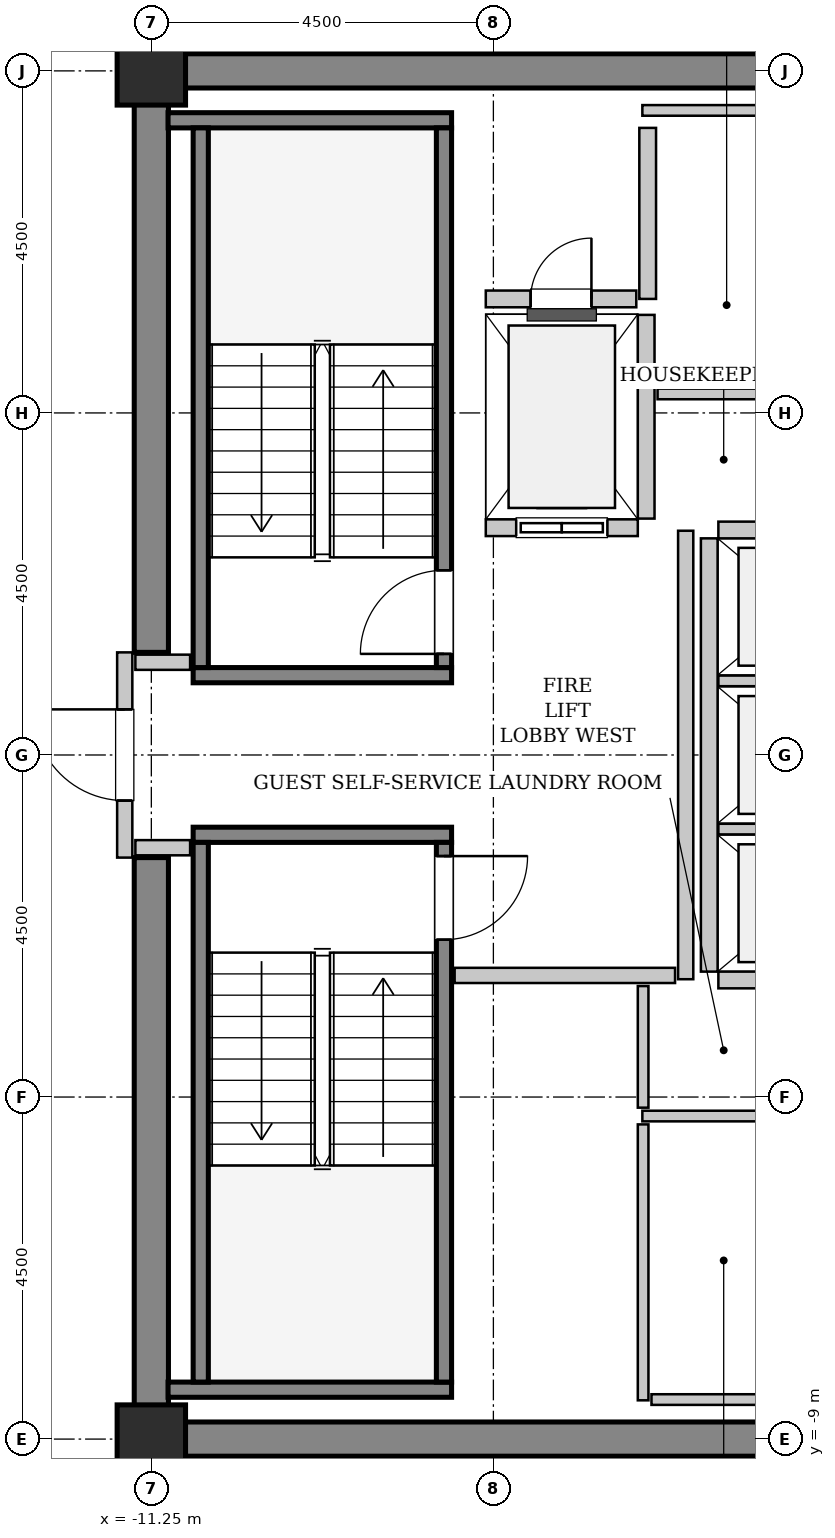
"""IFC4 building model, lengths in metres.
Left out: names, types, materials, properties, quantities, classifications, styles, units other than length and angle.
Written with IfcOpenShell. Run it as: python <this file> out.ifc"""

import sys

from ifc_helpers import new_model, si_unit, direction, frame, frame_2d, origin, origin_2d, place, context, subcontext, project, spatial, rectangle, extrude, source, transform, mapped, element, fill, save


model = new_model("IFC4")
c1 = context("Model", 3, precision=1e-05, world=origin(), true_north=direction((0.0, 1.0)))
c2 = subcontext(c1, "Body", "Model", "MODEL_VIEW")
j1 = project(units=[si_unit("LENGTHUNIT", "METRE"), si_unit("PLANEANGLEUNIT", "RADIAN")], contexts=[c1])
p1 = place(None, origin())
s1 = spatial("IfcSite", under=j1, at=p1, CompositionType="ELEMENT")
p2 = place(p1, origin())
s2 = spatial("IfcBuilding", under=s1, at=p2, CompositionType="ELEMENT")
p3 = place(p2, frame((0.0, 0.0, 314.0)))
s3 = spatial("IfcBuildingStorey", under=s2, at=p3, CompositionType="ELEMENT", Elevation=314.0)
m1 = source(origin(), c2, "Body", "SweptSolid", [
    extrude(rectangle(XDim=9.925, YDim=0.45, at=frame_2d((4.962, 0.0))), origin(), (0.0, 0.0, 1.0), 3.8),
])
for number, where, z_axis, x_axis in (
    (1, (-11.475, 9.0, 0.0), (0.0, 0.0, 1.0), (1.0, 0.0, 0.0)),
    (2, (-11.475, -9.0, 0.0), (0.0, 0.0, 1.0), (1.0, 0.0, 0.0)),
):
    element("IfcWall", number, at=place(p3, frame(where, z_axis=z_axis, x_axis=x_axis)), inside=s3, PredefinedType="SHEAR", context=c2, shape_type="MappedRepresentation", body=[
        mapped(m1, transform((0.0, 0.0, 0.0), x_axis=(1.0, 0.0, 0.0), y_axis=(0.0, 1.0, 0.0), z_axis=(0.0, 0.0, 1.0), scale=1.0)),
    ])
m2 = source(origin(), c2, "Body", "SweptSolid", [
    extrude(rectangle(XDim=7.425, YDim=0.45, at=frame_2d((3.712, 0.0))), origin(), (0.0, 0.0, 1.0), 3.8),
])
for number, where, z_axis, x_axis in (
    (3, (-11.25, -8.775, 0.0), (0.0, 0.0, 1.0), (0.0, 1.0, 0.0)),
    (4, (-11.25, 1.35, 0.0), (0.0, 0.0, 1.0), (0.0, 1.0, 0.0)),
):
    element("IfcWall", number, at=place(p3, frame(where, z_axis=z_axis, x_axis=x_axis)), inside=s3, PredefinedType="SHEAR", context=c2, shape_type="MappedRepresentation", body=[
        mapped(m2, transform((0.0, 0.0, 0.0), x_axis=(1.0, 0.0, 0.0), y_axis=(0.0, 1.0, 0.0), z_axis=(0.0, 0.0, 1.0), scale=1.0)),
    ])
m3 = source(origin(), c2, "Body", "SweptSolid", [
    extrude(rectangle(XDim=0.9, YDim=0.9, at=origin_2d()), origin(), (0.0, 0.0, 1.0), 3.8),
])
for number, where, z_axis, x_axis in (
    (5, (-11.25, -9.0, 0.0), (0.0, 0.0, 1.0), (1.0, 0.0, 0.0)),
    (6, (-11.25, 9.0, 0.0), (0.0, 0.0, 1.0), (1.0, 0.0, 0.0)),
):
    element("IfcColumn", number, at=place(p3, frame(where, z_axis=z_axis, x_axis=x_axis)), inside=s3, PredefinedType="COLUMN", context=c2, shape_type="MappedRepresentation", body=[
        mapped(m3, transform((0.0, 0.0, 0.0), x_axis=(1.0, 0.0, 0.0), y_axis=(0.0, 1.0, 0.0), z_axis=(0.0, 0.0, 1.0), scale=1.0)),
    ])
m4 = source(origin(), c2, "Body", "SweptSolid", [
    extrude(rectangle(XDim=3.4, YDim=0.2, at=frame_2d((1.7, 0.0))), origin(), (0.0, 0.0, 1.0), 3.8),
])
p4 = place(p3, frame((-7.3, 1.05, 0.0), z_axis=(0.0, 0.0, 1.0), x_axis=(-1.0, 0.0, 0.0)))
e7 = element("IfcWall", 7, at=p4, inside=s3, PredefinedType="SOLIDWALL", context=c2, shape_type="MappedRepresentation", body=[
    mapped(m4, transform((0.0, 0.0, 0.0), x_axis=(1.0, 0.0, 0.0), y_axis=(0.0, 1.0, 0.0), z_axis=(0.0, 0.0, 1.0), scale=1.0)),
])
m5 = source(origin(), c2, "Body", "SweptSolid", [
    extrude(rectangle(XDim=3.73, YDim=0.2, at=frame_2d((1.865, 0.0))), origin(), (0.0, 0.0, 1.0), 3.8),
])
p5 = place(p3, frame((-7.3, 8.35, 0.0), z_axis=(0.0, 0.0, 1.0), x_axis=(-1.0, 0.0, 0.0)))
e8 = element("IfcWall", 8, at=p5, inside=s3, PredefinedType="SOLIDWALL", context=c2, shape_type="MappedRepresentation", body=[
    mapped(m5, transform((0.0, 0.0, 0.0), x_axis=(1.0, 0.0, 0.0), y_axis=(0.0, 1.0, 0.0), z_axis=(0.0, 0.0, 1.0), scale=1.0)),
])
m6 = source(origin(), c2, "Body", "SweptSolid", [
    extrude(rectangle(XDim=7.1, YDim=0.2, at=frame_2d((3.55, 0.0))), origin(), (0.0, 0.0, 1.0), 3.8),
])
p6 = place(p3, frame((-7.4, 1.15, 0.0), z_axis=(0.0, 0.0, 1.0), x_axis=(0.0, 1.0, 0.0)))
e9 = element("IfcWall", 9, at=p6, inside=s3, PredefinedType="SOLIDWALL", context=c2, shape_type="MappedRepresentation", body=[
    mapped(m6, transform((0.0, 0.0, 0.0), x_axis=(1.0, 0.0, 0.0), y_axis=(0.0, 1.0, 0.0), z_axis=(0.0, 0.0, 1.0), scale=1.0)),
])
p7 = place(p6, frame((0.18, 0.0, 0.0)))
e10 = element("IfcOpeningElement", 10, at=p7, cuts=e9, PredefinedType="OPENING", context=c2, shape_type="SweptSolid", body=[
    extrude(rectangle(XDim=1.1, YDim=2.15, at=frame_2d((0.55, 1.075))), frame((0.0, 0.11, 0.0), z_axis=(0.0, -1.0, 0.0), x_axis=(1.0, 0.0, 0.0)), (0.0, 0.0, 1.0), 0.22),
])
p8 = place(p3, frame((-10.6, 1.15, 0.0), z_axis=(0.0, 0.0, 1.0), x_axis=(0.0, 1.0, 0.0)))
e11 = element("IfcWall", 11, at=p8, inside=s3, PredefinedType="SOLIDWALL", context=c2, shape_type="MappedRepresentation", body=[
    mapped(m6, transform((0.0, 0.0, 0.0), x_axis=(1.0, 0.0, 0.0), y_axis=(0.0, 1.0, 0.0), z_axis=(0.0, 0.0, 1.0), scale=1.0)),
])
p9 = place(p3, frame((-10.7, -1.05, 0.0), z_axis=(0.0, 0.0, 1.0), x_axis=(1.0, 0.0, 0.0)))
e12 = element("IfcWall", 12, at=p9, inside=s3, PredefinedType="SOLIDWALL", context=c2, shape_type="MappedRepresentation", body=[
    mapped(m4, transform((0.0, 0.0, 0.0), x_axis=(1.0, 0.0, 0.0), y_axis=(0.0, 1.0, 0.0), z_axis=(0.0, 0.0, 1.0), scale=1.0)),
])
p10 = place(p3, frame((-11.03, -8.35, 0.0), z_axis=(0.0, 0.0, 1.0), x_axis=(1.0, 0.0, 0.0)))
e13 = element("IfcWall", 13, at=p10, inside=s3, PredefinedType="SOLIDWALL", context=c2, shape_type="MappedRepresentation", body=[
    mapped(m5, transform((0.0, 0.0, 0.0), x_axis=(1.0, 0.0, 0.0), y_axis=(0.0, 1.0, 0.0), z_axis=(0.0, 0.0, 1.0), scale=1.0)),
])
p11 = place(p3, frame((-10.6, -1.15, 0.0), z_axis=(0.0, 0.0, 1.0), x_axis=(0.0, -1.0, 0.0)))
e14 = element("IfcWall", 14, at=p11, inside=s3, PredefinedType="SOLIDWALL", context=c2, shape_type="MappedRepresentation", body=[
    mapped(m6, transform((0.0, 0.0, 0.0), x_axis=(1.0, 0.0, 0.0), y_axis=(0.0, 1.0, 0.0), z_axis=(0.0, 0.0, 1.0), scale=1.0)),
])
p12 = place(p3, frame((-7.4, -1.15, 0.0), z_axis=(0.0, 0.0, 1.0), x_axis=(0.0, -1.0, 0.0)))
e15 = element("IfcWall", 15, at=p12, inside=s3, PredefinedType="SOLIDWALL", context=c2, shape_type="MappedRepresentation", body=[
    mapped(m6, transform((0.0, 0.0, 0.0), x_axis=(1.0, 0.0, 0.0), y_axis=(0.0, 1.0, 0.0), z_axis=(0.0, 0.0, 1.0), scale=1.0)),
])
p13 = place(p12, frame((0.18, 0.0, 0.0)))
e16 = element("IfcOpeningElement", 16, at=p13, cuts=e15, PredefinedType="OPENING", context=c2, shape_type="SweptSolid", body=[
    extrude(rectangle(XDim=1.1, YDim=2.15, at=frame_2d((0.55, 1.075))), frame((0.0, 0.11, 0.0), z_axis=(0.0, -1.0, 0.0), x_axis=(1.0, 0.0, 0.0)), (0.0, 0.0, 1.0), 0.22),
])
m7 = source(origin(), c2, "Body", "SweptSolid", [
    extrude(rectangle(XDim=2.0, YDim=0.22, at=frame_2d((1.0, 0.0))), origin(), (0.0, 0.0, 1.0), 3.485),
])
p14 = place(p3, frame((-6.85, 2.99, 0.0), z_axis=(0.0, 0.0, 1.0), x_axis=(1.0, 0.0, 0.0)))
e17 = element("IfcWall", 17, at=p14, inside=s3, PredefinedType="SOLIDWALL", context=c2, shape_type="MappedRepresentation", body=[
    mapped(m7, transform((0.0, 0.0, 0.0), x_axis=(1.0, 0.0, 0.0), y_axis=(0.0, 1.0, 0.0), z_axis=(0.0, 0.0, 1.0), scale=1.0)),
])
p15 = place(p14, frame((0.4, 0.0, 0.0)))
e18 = element("IfcOpeningElement", 18, at=p15, cuts=e17, PredefinedType="OPENING", context=c2, shape_type="SweptSolid", body=[
    extrude(rectangle(XDim=1.2, YDim=2.2, at=frame_2d((0.6, 1.1))), frame((0.0, 0.12, 0.0), z_axis=(0.0, -1.0, 0.0), x_axis=(1.0, 0.0, 0.0)), (0.0, 0.0, 1.0), 0.24),
])
m8 = source(origin(), c2, "Body", "SweptSolid", [
    extrude(rectangle(XDim=2.68, YDim=0.22, at=frame_2d((1.34, 0.0))), origin(), (0.0, 0.0, 1.0), 3.485),
])
p16 = place(p3, frame((-4.74, 3.11, 0.0), z_axis=(0.0, 0.0, 1.0), x_axis=(0.0, 1.0, 0.0)))
e19 = element("IfcWall", 19, at=p16, inside=s3, PredefinedType="SOLIDWALL", context=c2, shape_type="MappedRepresentation", body=[
    mapped(m8, transform((0.0, 0.0, 0.0), x_axis=(1.0, 0.0, 0.0), y_axis=(0.0, 1.0, 0.0), z_axis=(0.0, 0.0, 1.0), scale=1.0)),
])
m9 = source(origin(), c2, "Body", "SweptSolid", [
    extrude(rectangle(XDim=5.7, YDim=0.22, at=frame_2d((2.85, 0.0))), origin(), (0.0, 0.0, 1.0), 3.485),
])
p17 = place(p3, frame((-3.91, 2.85, 0.0), z_axis=(0.0, 0.0, 1.0), x_axis=(0.0, -1.0, 0.0)))
e20 = element("IfcWall", 20, at=p17, inside=s3, PredefinedType="SOLIDWALL", context=c2, shape_type="MappedRepresentation", body=[
    mapped(m9, transform((0.0, 0.0, 0.0), x_axis=(1.0, 0.0, 0.0), y_axis=(0.0, 1.0, 0.0), z_axis=(0.0, 0.0, 1.0), scale=1.0)),
])
m10 = source(origin(), c2, "Body", "SweptSolid", [
    extrude(rectangle(XDim=2.13, YDim=0.22, at=frame_2d((1.065, 0.0))), origin(), (0.0, 0.0, 1.0), 3.485),
])
p18 = place(p3, frame((-3.79, -2.96, 0.0), z_axis=(0.0, 0.0, 1.0), x_axis=(1.0, 0.0, 0.0)))
e21 = element("IfcWall", 21, at=p18, inside=s3, PredefinedType="SOLIDWALL", context=c2, shape_type="MappedRepresentation", body=[
    mapped(m10, transform((0.0, 0.0, 0.0), x_axis=(1.0, 0.0, 0.0), y_axis=(0.0, 1.0, 0.0), z_axis=(0.0, 0.0, 1.0), scale=1.0)),
])
m11 = source(origin(), c2, "Body", "SweptSolid", [
    extrude(rectangle(XDim=2.13, YDim=0.14, at=frame_2d((1.065, 0.0))), origin(), (0.0, 0.0, 1.0), 3.485),
])
for number, where, z_axis, x_axis in (
    (22, (-3.79, -0.975, 0.0), (0.0, 0.0, 1.0), (1.0, 0.0, 0.0)),
    (23, (-3.79, 0.975, 0.0), (0.0, 0.0, 1.0), (1.0, 0.0, 0.0)),
):
    element("IfcWall", number, at=place(p3, frame(where, z_axis=z_axis, x_axis=x_axis)), inside=s3, PredefinedType="PARTITIONING", context=c2, shape_type="MappedRepresentation", body=[
        mapped(m11, transform((0.0, 0.0, 0.0), x_axis=(1.0, 0.0, 0.0), y_axis=(0.0, 1.0, 0.0), z_axis=(0.0, 0.0, 1.0), scale=1.0)),
    ])
p19 = place(p3, frame((-1.66, 2.96, 0.0), z_axis=(0.0, 0.0, 1.0), x_axis=(-1.0, 0.0, 0.0)))
e24 = element("IfcWall", 24, at=p19, inside=s3, PredefinedType="SOLIDWALL", context=c2, shape_type="MappedRepresentation", body=[
    mapped(m10, transform((0.0, 0.0, 0.0), x_axis=(1.0, 0.0, 0.0), y_axis=(0.0, 1.0, 0.0), z_axis=(0.0, 0.0, 1.0), scale=1.0)),
])
m12 = source(origin(), c2, "Body", "SweptSolid", [
    extrude(rectangle(XDim=2.25, YDim=0.22, at=frame_2d((1.125, 0.0))), origin(), (0.0, 0.0, 1.0), 3.485),
])
p20 = place(p3, frame((-4.72, 6.0, 0.0), z_axis=(0.0, 0.0, 1.0), x_axis=(0.0, 1.0, 0.0)))
e25 = element("IfcWall", 25, at=p20, inside=s3, PredefinedType="SOLIDWALL", context=c2, shape_type="MappedRepresentation", body=[
    mapped(m12, transform((0.0, 0.0, 0.0), x_axis=(1.0, 0.0, 0.0), y_axis=(0.0, 1.0, 0.0), z_axis=(0.0, 0.0, 1.0), scale=1.0)),
])
m13 = source(origin(), c2, "Body", "SweptSolid", [
    extrude(rectangle(XDim=1.98, YDim=0.22, at=frame_2d((0.99, 0.0))), origin(), (0.0, 0.0, 1.0), 3.485),
])
p21 = place(p3, frame((-6.85, 6.0, 0.0), z_axis=(0.0, 0.0, 1.0), x_axis=(1.0, 0.0, 0.0)))
e26 = element("IfcWall", 26, at=p21, inside=s3, PredefinedType="SOLIDWALL", context=c2, shape_type="MappedRepresentation", body=[
    mapped(m13, transform((0.0, 0.0, 0.0), x_axis=(1.0, 0.0, 0.0), y_axis=(0.0, 1.0, 0.0), z_axis=(0.0, 0.0, 1.0), scale=1.0)),
])
p22 = place(p21, frame((0.59, 0.0, 0.0)))
e27 = element("IfcOpeningElement", 27, at=p22, cuts=e26, PredefinedType="OPENING", context=c2, shape_type="SweptSolid", body=[
    extrude(rectangle(XDim=0.8, YDim=2.0, at=frame_2d((0.4, 1.0))), frame((0.0, 0.12, 0.0), z_axis=(0.0, -1.0, 0.0), x_axis=(1.0, 0.0, 0.0)), (0.0, 0.0, 1.0), 0.24),
])
m14 = source(origin(), c2, "Body", "SweptSolid", [
    extrude(rectangle(XDim=2.7, YDim=0.2, at=frame_2d((1.35, 0.0))), origin(), (0.0, 0.0, 1.0), 2.575),
])
p23 = place(p3, frame((-11.6, -1.35, 0.0), z_axis=(0.0, 0.0, 1.0), x_axis=(0.0, 1.0, 0.0)))
e28 = element("IfcWall", 28, at=p23, inside=s3, PredefinedType="PARTITIONING", context=c2, shape_type="MappedRepresentation", body=[
    mapped(m14, transform((0.0, 0.0, 0.0), x_axis=(1.0, 0.0, 0.0), y_axis=(0.0, 1.0, 0.0), z_axis=(0.0, 0.0, 1.0), scale=1.0)),
])
p24 = place(p23, frame((0.75, 0.0, 0.0)))
e29 = element("IfcOpeningElement", 29, at=p24, cuts=e28, PredefinedType="OPENING", context=c2, shape_type="SweptSolid", body=[
    extrude(rectangle(XDim=1.2, YDim=2.15, at=frame_2d((0.6, 1.075))), frame((0.0, 0.11, 0.0), z_axis=(0.0, -1.0, 0.0), x_axis=(1.0, 0.0, 0.0)), (0.0, 0.0, 1.0), 0.22),
])
m15 = source(origin(), c2, "Body", "SweptSolid", [
    extrude(rectangle(XDim=5.9, YDim=0.2, at=frame_2d((2.95, 0.0))), origin(), (0.0, 0.0, 1.0), 3.485),
])
p25 = place(p3, frame((-4.22, -2.95, 0.0), z_axis=(0.0, 0.0, 1.0), x_axis=(0.0, 1.0, 0.0)))
e30 = element("IfcWall", 30, at=p25, inside=s3, PredefinedType="PARTITIONING", context=c2, shape_type="MappedRepresentation", body=[
    mapped(m15, transform((0.0, 0.0, 0.0), x_axis=(1.0, 0.0, 0.0), y_axis=(0.0, 1.0, 0.0), z_axis=(0.0, 0.0, 1.0), scale=1.0)),
])
m16 = source(origin(), c2, "Body", "SweptSolid", [
    extrude(rectangle(XDim=2.9, YDim=0.2, at=frame_2d((1.45, 0.0))), origin(), (0.0, 0.0, 1.0), 3.485),
])
p26 = place(p3, frame((-7.26, -2.9, 0.0), z_axis=(0.0, 0.0, 1.0), x_axis=(1.0, 0.0, 0.0)))
e31 = element("IfcWall", 31, at=p26, inside=s3, PredefinedType="PARTITIONING", context=c2, shape_type="MappedRepresentation", body=[
    mapped(m16, transform((0.0, 0.0, 0.0), x_axis=(1.0, 0.0, 0.0), y_axis=(0.0, 1.0, 0.0), z_axis=(0.0, 0.0, 1.0), scale=1.0)),
])
m17 = source(origin(), c2, "Body", "SweptSolid", [
    extrude(rectangle(XDim=0.72, YDim=0.2, at=frame_2d((0.36, 0.0))), origin(), (0.0, 0.0, 1.0), 3.485),
])
for number, where, z_axis, x_axis in (
    (32, (-11.46, 1.22, 0.0), (0.0, 0.0, 1.0), (1.0, 0.0, 0.0)),
    (33, (-11.46, -1.22, 0.0), (0.0, 0.0, 1.0), (1.0, 0.0, 0.0)),
):
    element("IfcWall", number, at=place(p3, frame(where, z_axis=z_axis, x_axis=x_axis)), inside=s3, PredefinedType="PARTITIONING", context=c2, shape_type="MappedRepresentation", body=[
        mapped(m17, transform((0.0, 0.0, 0.0), x_axis=(1.0, 0.0, 0.0), y_axis=(0.0, 1.0, 0.0), z_axis=(0.0, 0.0, 1.0), scale=1.0)),
    ])
m18 = source(origin(), c2, "Body", "SweptSolid", [
    extrude(rectangle(XDim=2.95, YDim=0.14, at=frame_2d((1.475, 0.0))), origin(), (0.0, 0.0, 1.0), 3.485),
])
p27 = place(p3, frame((-4.59, 4.75, 0.0), z_axis=(0.0, 0.0, 1.0), x_axis=(1.0, 0.0, 0.0)))
e34 = element("IfcWall", 34, at=p27, inside=s3, PredefinedType="PARTITIONING", context=c2, shape_type="MappedRepresentation", body=[
    mapped(m18, transform((0.0, 0.0, 0.0), x_axis=(1.0, 0.0, 0.0), y_axis=(0.0, 1.0, 0.0), z_axis=(0.0, 0.0, 1.0), scale=1.0)),
])
m19 = source(origin(), c2, "Body", "SweptSolid", [
    extrude(rectangle(XDim=3.15, YDim=0.14, at=frame_2d((1.575, 0.0))), origin(), (0.0, 0.0, 1.0), 3.485),
])
for number, where, z_axis, x_axis in (
    (35, (-4.79, 8.48, 0.0), (0.0, 0.0, 1.0), (1.0, 0.0, 0.0)),
    (36, (-4.79, -4.75, 0.0), (0.0, 0.0, 1.0), (1.0, 0.0, 0.0)),
):
    element("IfcWall", number, at=place(p3, frame(where, z_axis=z_axis, x_axis=x_axis)), inside=s3, PredefinedType="PARTITIONING", context=c2, shape_type="MappedRepresentation", body=[
        mapped(m19, transform((0.0, 0.0, 0.0), x_axis=(1.0, 0.0, 0.0), y_axis=(0.0, 1.0, 0.0), z_axis=(0.0, 0.0, 1.0), scale=1.0)),
    ])
m20 = source(origin(), c2, "Body", "SweptSolid", [
    extrude(rectangle(XDim=1.6, YDim=0.14, at=frame_2d((0.8, 0.0))), origin(), (0.0, 0.0, 1.0), 3.485),
])
p28 = place(p3, frame((-4.78, -4.64, 0.0), z_axis=(0.0, 0.0, 1.0), x_axis=(0.0, 1.0, 0.0)))
e37 = element("IfcWall", 37, at=p28, inside=s3, PredefinedType="PARTITIONING", context=c2, shape_type="MappedRepresentation", body=[
    mapped(m20, transform((0.0, 0.0, 0.0), x_axis=(1.0, 0.0, 0.0), y_axis=(0.0, 1.0, 0.0), z_axis=(0.0, 0.0, 1.0), scale=1.0)),
])
m21 = source(origin(), c2, "Body", "SweptSolid", [
    extrude(rectangle(XDim=3.63, YDim=0.14, at=frame_2d((1.815, 0.0))), origin(), (0.0, 0.0, 1.0), 3.485),
])
p29 = place(p3, frame((-4.78, -8.49, 0.0), z_axis=(0.0, 0.0, 1.0), x_axis=(0.0, 1.0, 0.0)))
e38 = element("IfcWall", 38, at=p29, inside=s3, PredefinedType="PARTITIONING", context=c2, shape_type="MappedRepresentation", body=[
    mapped(m21, transform((0.0, 0.0, 0.0), x_axis=(1.0, 0.0, 0.0), y_axis=(0.0, 1.0, 0.0), z_axis=(0.0, 0.0, 1.0), scale=1.0)),
])
m22 = source(origin(), c2, "Body", "SweptSolid", [
    extrude(rectangle(XDim=3.03, YDim=0.14, at=frame_2d((1.515, 0.0))), origin(), (0.0, 0.0, 1.0), 3.485),
])
p30 = place(p3, frame((-4.67, -8.48, 0.0), z_axis=(0.0, 0.0, 1.0), x_axis=(1.0, 0.0, 0.0)))
e39 = element("IfcWall", 39, at=p30, inside=s3, PredefinedType="PARTITIONING", context=c2, shape_type="MappedRepresentation", body=[
    mapped(m22, transform((0.0, 0.0, 0.0), x_axis=(1.0, 0.0, 0.0), y_axis=(0.0, 1.0, 0.0), z_axis=(0.0, 0.0, 1.0), scale=1.0)),
])
m23 = source(origin(), c2, "Body", "SweptSolid", [
    extrude(rectangle(XDim=1.1, YDim=2.15, at=frame_2d((0.55, 1.075))), frame((0.0, 0.025, 0.0), z_axis=(0.0, -1.0, 0.0), x_axis=(1.0, 0.0, 0.0)), (0.0, 0.0, 1.0), 0.05),
])
p31 = place(p7, origin())
e40 = element("IfcDoor", 40, at=p31, inside=s3, OperationType="SINGLE_SWING_LEFT", PredefinedType="DOOR", context=c2, shape_type="MappedRepresentation", body=[
    mapped(m23, transform((0.0, 0.0, 0.0), x_axis=(1.0, 0.0, 0.0), y_axis=(0.0, 1.0, 0.0), z_axis=(0.0, 0.0, 1.0), scale=1.0)),
])
fill(e10, e40)
p32 = place(p13, origin())
e41 = element("IfcDoor", 41, at=p32, inside=s3, OperationType="SINGLE_SWING_LEFT", PredefinedType="DOOR", context=c2, shape_type="MappedRepresentation", body=[
    mapped(m23, transform((0.0, 0.0, 0.0), x_axis=(1.0, 0.0, 0.0), y_axis=(0.0, 1.0, 0.0), z_axis=(0.0, 0.0, 1.0), scale=1.0)),
])
fill(e16, e41)
m24 = source(origin(), c2, "Body", "SweptSolid", [
    extrude(rectangle(XDim=1.2, YDim=2.2, at=frame_2d((0.6, 1.1))), frame((0.0, 0.025, 0.0), z_axis=(0.0, -1.0, 0.0), x_axis=(1.0, 0.0, 0.0)), (0.0, 0.0, 1.0), 0.05),
])
p33 = place(p15, origin())
e42 = element("IfcDoor", 42, at=p33, inside=s3, OperationType="SLIDING_TO_LEFT", PredefinedType="DOOR", context=c2, shape_type="MappedRepresentation", body=[
    mapped(m24, transform((0.0, 0.0, 0.0), x_axis=(1.0, 0.0, 0.0), y_axis=(0.0, 1.0, 0.0), z_axis=(0.0, 0.0, 1.0), scale=1.0)),
])
fill(e18, e42)
m25 = source(origin(), c2, "Body", "SweptSolid", [
    extrude(rectangle(XDim=0.8, YDim=2.0, at=frame_2d((0.4, 1.0))), frame((0.0, 0.025, 0.0), z_axis=(0.0, -1.0, 0.0), x_axis=(1.0, 0.0, 0.0)), (0.0, 0.0, 1.0), 0.05),
])
p34 = place(p22, origin())
e43 = element("IfcDoor", 43, at=p34, inside=s3, OperationType="SINGLE_SWING_RIGHT", PredefinedType="TRAPDOOR", context=c2, shape_type="MappedRepresentation", body=[
    mapped(m25, transform((0.0, 0.0, 0.0), x_axis=(1.0, 0.0, 0.0), y_axis=(0.0, 1.0, 0.0), z_axis=(0.0, 0.0, 1.0), scale=1.0)),
])
fill(e27, e43)
m26 = source(origin(), c2, "Body", "SweptSolid", [
    extrude(rectangle(XDim=1.2, YDim=2.15, at=frame_2d((0.6, 1.075))), frame((0.0, 0.025, 0.0), z_axis=(0.0, -1.0, 0.0), x_axis=(1.0, 0.0, 0.0)), (0.0, 0.0, 1.0), 0.05),
])
p35 = place(p24, origin())
e44 = element("IfcDoor", 44, at=p35, inside=s3, OperationType="SINGLE_SWING_RIGHT", PredefinedType="DOOR", context=c2, shape_type="MappedRepresentation", body=[
    mapped(m26, transform((0.0, 0.0, 0.0), x_axis=(1.0, 0.0, 0.0), y_axis=(0.0, 1.0, 0.0), z_axis=(0.0, 0.0, 1.0), scale=1.0)),
])
fill(e29, e44)
save(model, sys.argv[1])
